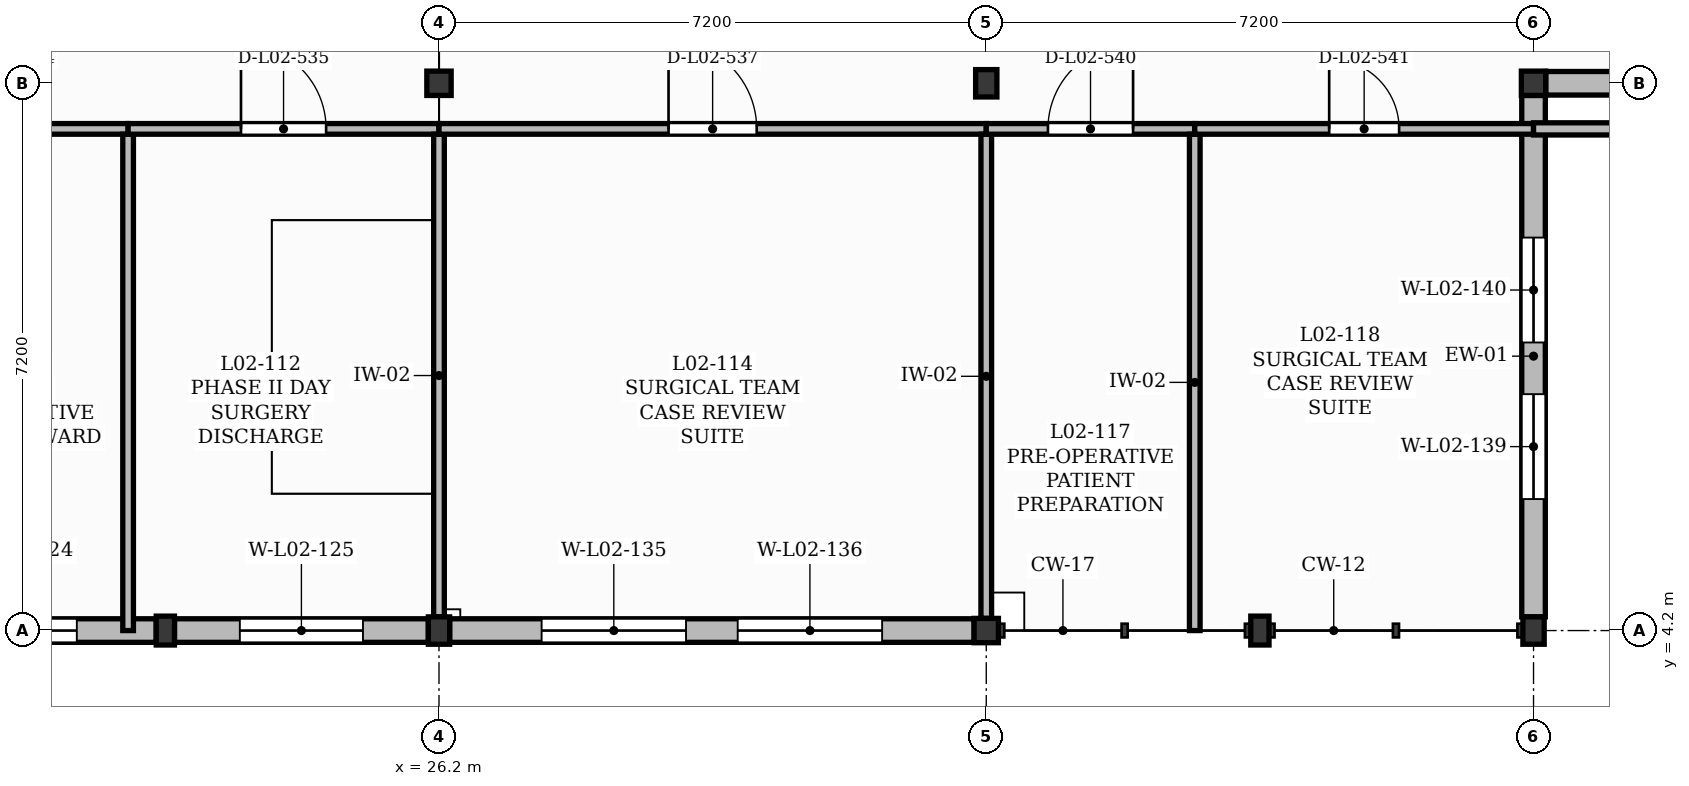
"""IFC4 building model, lengths in metres.
Left out: names, types, materials, properties, quantities, classifications, styles, units other than length and angle.
Written with IfcOpenShell. Run it as: python <this file> out.ifc"""

import sys

from ifc_helpers import new_model, si_unit, direction, frame, frame_2d, origin, origin_2d, place, context, subcontext, project, spatial, rectangle, extrude, element, fill, save


model = new_model("IFC4")
c1 = context("Model", 3, precision=1e-05, world=origin(), true_north=direction((0.0, 1.0)))
c2 = subcontext(c1, "Body", "Model", "MODEL_VIEW")
j1 = project(units=[si_unit("LENGTHUNIT", "METRE"), si_unit("PLANEANGLEUNIT", "RADIAN")], contexts=[c1])
p1 = place(None, origin())
s1 = spatial("IfcSite", under=j1, at=p1, CompositionType="ELEMENT")
p2 = place(p1, origin())
s2 = spatial("IfcBuilding", under=s1, at=p2, CompositionType="ELEMENT")
p3 = place(p2, frame((0.0, 0.0, 9.0)))
s3 = spatial("IfcBuildingStorey", under=s2, at=p3, CompositionType="ELEMENT", Elevation=9.0)
p4 = place(p3, frame((26.2, 4.2, 0.0), z_axis=(0.0, 0.0, 1.0), x_axis=(1.0, 0.0, 0.0)))
e1 = element("IfcColumn", 1, at=p4, inside=s3, PredefinedType="COLUMN", context=c2, shape_type="SweptSolid", body=[
    extrude(rectangle(XDim=0.28, YDim=0.36, at=origin_2d()), origin(), (0.0, 0.0, 1.0), 3.95),
])
for number, where, z_axis, x_axis in (
    (2, (26.2, 11.4, 0.0), (0.0, 0.0, 1.0), (1.0, 0.0, 0.0)),
    (3, (33.4, 4.2, 0.0), (0.0, 0.0, 1.0), (1.0, 0.0, 0.0)),
):
    element("IfcColumn", number, at=place(p3, frame(where, z_axis=z_axis, x_axis=x_axis)), inside=s3, PredefinedType="COLUMN", context=c2, shape_type="SweptSolid", body=[
        extrude(rectangle(XDim=0.32, YDim=0.32, at=origin_2d()), origin(), (0.0, 0.0, 1.0), 3.95),
    ])
for number, where, z_axis, x_axis in (
    (4, (33.4, 11.4, 0.0), (0.0, 0.0, 1.0), (1.0, 0.0, 0.0)),
    (5, (40.6, 4.2, 0.0), (0.0, 0.0, 1.0), (1.0, 0.0, 0.0)),
):
    element("IfcColumn", number, at=place(p3, frame(where, z_axis=z_axis, x_axis=x_axis)), inside=s3, PredefinedType="COLUMN", context=c2, shape_type="SweptSolid", body=[
        extrude(rectangle(XDim=0.28, YDim=0.36, at=origin_2d()), origin(), (0.0, 0.0, 1.0), 3.95),
    ])
p5 = place(p3, frame((40.6, 11.4, 0.0), z_axis=(0.0, 0.0, 1.0), x_axis=(1.0, 0.0, 0.0)))
e6 = element("IfcColumn", 6, at=p5, inside=s3, PredefinedType="COLUMN", context=c2, shape_type="SweptSolid", body=[
    extrude(rectangle(XDim=0.32, YDim=0.32, at=origin_2d()), origin(), (0.0, 0.0, 1.0), 3.95),
])
for number, where, z_axis, x_axis in (
    (7, (22.6, 4.2, 0.0), (0.0, 0.0, 1.0), (1.0, 0.0, 0.0)),
    (8, (37.0, 4.2, 0.0), (0.0, 0.0, 1.0), (1.0, 0.0, 0.0)),
):
    element("IfcColumn", number, at=place(p3, frame(where, z_axis=z_axis, x_axis=x_axis)), inside=s3, PredefinedType="PILASTER", context=c2, shape_type="SweptSolid", body=[
        extrude(rectangle(XDim=0.24, YDim=0.38, at=origin_2d()), origin(), (0.0, 0.0, 1.0), 3.95),
    ])
p6 = place(p3, frame((19.16, 4.2, 0.0), z_axis=(0.0, 0.0, 1.0), x_axis=(1.0, 0.0, 0.0)))
e9 = element("IfcWall", 9, at=p6, inside=s3, PredefinedType="SOLIDWALL", context=c2, shape_type="SweptSolid", body=[
    extrude(rectangle(XDim=3.32, YDim=0.31, at=frame_2d((1.66, 0.0))), origin(), (0.0, 0.0, 1.0), 3.49),
])
p7 = place(p6, frame((0.795, 0.0, 1.0)))
e10 = element("IfcOpeningElement", 10, at=p7, cuts=e9, PredefinedType="OPENING", context=c2, shape_type="SweptSolid", body=[
    extrude(rectangle(XDim=1.48, YDim=1.95, at=frame_2d((0.74, 0.975))), frame((0.0, 0.165, 0.0), z_axis=(0.0, -1.0, 0.0), x_axis=(1.0, 0.0, 0.0)), (0.0, 0.0, 1.0), 0.33),
])
p8 = place(p3, frame((22.72, 4.2, 0.0), z_axis=(0.0, 0.0, 1.0), x_axis=(1.0, 0.0, 0.0)))
e11 = element("IfcWall", 11, at=p8, inside=s3, PredefinedType="SOLIDWALL", context=c2, shape_type="SweptSolid", body=[
    extrude(rectangle(XDim=3.34, YDim=0.31, at=frame_2d((1.67, 0.0))), origin(), (0.0, 0.0, 1.0), 3.49),
])
p9 = place(p8, frame((0.86, 0.0, 1.0)))
e12 = element("IfcOpeningElement", 12, at=p9, cuts=e11, PredefinedType="OPENING", context=c2, shape_type="SweptSolid", body=[
    extrude(rectangle(XDim=1.62, YDim=1.95, at=frame_2d((0.81, 0.975))), frame((0.0, 0.165, 0.0), z_axis=(0.0, -1.0, 0.0), x_axis=(1.0, 0.0, 0.0)), (0.0, 0.0, 1.0), 0.33),
])
p10 = place(p3, frame((26.34, 4.2, 0.0), z_axis=(0.0, 0.0, 1.0), x_axis=(1.0, 0.0, 0.0)))
e13 = element("IfcWall", 13, at=p10, inside=s3, PredefinedType="SOLIDWALL", context=c2, shape_type="SweptSolid", body=[
    extrude(rectangle(XDim=6.9, YDim=0.31, at=frame_2d((3.45, 0.0))), origin(), (0.0, 0.0, 1.0), 3.49),
])
p11 = place(p10, frame((1.21, 0.0, 1.0)))
e14 = element("IfcOpeningElement", 14, at=p11, cuts=e13, PredefinedType="OPENING", context=c2, shape_type="SweptSolid", body=[
    extrude(rectangle(XDim=1.9, YDim=1.95, at=frame_2d((0.95, 0.975))), frame((0.0, 0.165, 0.0), z_axis=(0.0, -1.0, 0.0), x_axis=(1.0, 0.0, 0.0)), (0.0, 0.0, 1.0), 0.33),
])
p12 = place(p10, frame((3.79, 0.0, 1.0)))
e15 = element("IfcOpeningElement", 15, at=p12, cuts=e13, PredefinedType="OPENING", context=c2, shape_type="SweptSolid", body=[
    extrude(rectangle(XDim=1.9, YDim=1.95, at=frame_2d((0.95, 0.975))), frame((0.0, 0.165, 0.0), z_axis=(0.0, -1.0, 0.0), x_axis=(1.0, 0.0, 0.0)), (0.0, 0.0, 1.0), 0.33),
])
p13 = place(p3, frame((40.6, 4.38, 0.0), z_axis=(0.0, 0.0, 1.0), x_axis=(0.0, 1.0, 0.0)))
e16 = element("IfcWall", 16, at=p13, inside=s3, PredefinedType="SOLIDWALL", context=c2, shape_type="SweptSolid", body=[
    extrude(rectangle(XDim=6.86, YDim=0.31, at=frame_2d((3.43, 0.0))), origin(), (0.0, 0.0, 1.0), 3.49),
])
p14 = place(p13, frame((1.55, 0.0, 1.0)))
e17 = element("IfcOpeningElement", 17, at=p14, cuts=e16, PredefinedType="OPENING", context=c2, shape_type="SweptSolid", body=[
    extrude(rectangle(XDim=1.38, YDim=1.8, at=frame_2d((0.69, 0.9))), frame((0.0, 0.165, 0.0), z_axis=(0.0, -1.0, 0.0), x_axis=(1.0, 0.0, 0.0)), (0.0, 0.0, 1.0), 0.33),
])
p15 = place(p13, frame((3.61, 0.0, 1.0)))
e18 = element("IfcOpeningElement", 18, at=p15, cuts=e16, PredefinedType="OPENING", context=c2, shape_type="SweptSolid", body=[
    extrude(rectangle(XDim=1.38, YDim=1.8, at=frame_2d((0.69, 0.9))), frame((0.0, 0.165, 0.0), z_axis=(0.0, -1.0, 0.0), x_axis=(1.0, 0.0, 0.0)), (0.0, 0.0, 1.0), 0.33),
])
p16 = place(p3, frame((40.76, 11.4, 0.0), z_axis=(0.0, 0.0, 1.0), x_axis=(1.0, 0.0, 0.0)))
e19 = element("IfcWall", 19, at=p16, inside=s3, PredefinedType="SOLIDWALL", context=c2, shape_type="SweptSolid", body=[
    extrude(rectangle(XDim=6.9, YDim=0.31, at=frame_2d((3.45, 0.0))), origin(), (0.0, 0.0, 1.0), 3.49),
])
p17 = place(p16, frame((1.45, 0.0, 1.0)))
e20 = element("IfcOpeningElement", 20, at=p17, cuts=e19, PredefinedType="OPENING", context=c2, shape_type="SweptSolid", body=[
    extrude(rectangle(XDim=1.66, YDim=1.8, at=frame_2d((0.83, 0.9))), frame((0.0, 0.165, 0.0), z_axis=(0.0, -1.0, 0.0), x_axis=(1.0, 0.0, 0.0)), (0.0, 0.0, 1.0), 0.33),
])
p18 = place(p16, frame((3.79, 0.0, 1.0)))
e21 = element("IfcOpeningElement", 21, at=p18, cuts=e19, PredefinedType="OPENING", context=c2, shape_type="SweptSolid", body=[
    extrude(rectangle(XDim=1.66, YDim=1.8, at=frame_2d((0.83, 0.9))), frame((0.0, 0.165, 0.0), z_axis=(0.0, -1.0, 0.0), x_axis=(1.0, 0.0, 0.0)), (0.0, 0.0, 1.0), 0.33),
])
p19 = place(p3, frame((19.0, 10.8, 0.0), z_axis=(0.0, 0.0, 1.0), x_axis=(1.0, 0.0, 0.0)))
e22 = element("IfcWall", 22, at=p19, inside=s3, PredefinedType="PARTITIONING", context=c2, shape_type="SweptSolid", body=[
    extrude(rectangle(XDim=3.11, YDim=0.14, at=frame_2d((1.555, 0.0))), origin(), (0.0, 0.0, 1.0), 3.91),
])
p20 = place(p19, frame((1.035, 0.0, 0.0)))
e23 = element("IfcOpeningElement", 23, at=p20, cuts=e22, PredefinedType="OPENING", context=c2, shape_type="SweptSolid", body=[
    extrude(rectangle(XDim=1.04, YDim=2.1, at=frame_2d((0.52, 1.05))), frame((0.0, 0.08, 0.0), z_axis=(0.0, -1.0, 0.0), x_axis=(1.0, 0.0, 0.0)), (0.0, 0.0, 1.0), 0.16),
])
p21 = place(p3, frame((22.11, 4.2, 0.0), z_axis=(0.0, 0.0, 1.0), x_axis=(0.0, 1.0, 0.0)))
e24 = element("IfcWall", 24, at=p21, inside=s3, PredefinedType="PARTITIONING", context=c2, shape_type="SweptSolid", body=[
    extrude(rectangle(XDim=6.53, YDim=0.14, at=frame_2d((3.265, 0.0))), origin(), (0.0, 0.0, 1.0), 3.91),
])
p22 = place(p3, frame((22.11, 10.8, 0.0), z_axis=(0.0, 0.0, 1.0), x_axis=(1.0, 0.0, 0.0)))
e25 = element("IfcWall", 25, at=p22, inside=s3, PredefinedType="PARTITIONING", context=c2, shape_type="SweptSolid", body=[
    extrude(rectangle(XDim=4.09, YDim=0.14, at=frame_2d((2.045, 0.0))), origin(), (0.0, 0.0, 1.0), 3.91),
])
p23 = place(p22, frame((1.485, 0.0, 0.0)))
e26 = element("IfcOpeningElement", 26, at=p23, cuts=e25, PredefinedType="OPENING", context=c2, shape_type="SweptSolid", body=[
    extrude(rectangle(XDim=1.12, YDim=2.15, at=frame_2d((0.56, 1.075))), frame((0.0, 0.08, 0.0), z_axis=(0.0, -1.0, 0.0), x_axis=(1.0, 0.0, 0.0)), (0.0, 0.0, 1.0), 0.16),
])
p24 = place(p3, frame((26.2, 4.38, 0.0), z_axis=(0.0, 0.0, 1.0), x_axis=(0.0, 1.0, 0.0)))
e27 = element("IfcWall", 27, at=p24, inside=s3, PredefinedType="PARTITIONING", context=c2, shape_type="SweptSolid", body=[
    extrude(rectangle(XDim=6.35, YDim=0.14, at=frame_2d((3.175, 0.0))), origin(), (0.0, 0.0, 1.0), 3.49),
])
p25 = place(p3, frame((26.2, 10.8, 0.0), z_axis=(0.0, 0.0, 1.0), x_axis=(1.0, 0.0, 0.0)))
e28 = element("IfcWall", 28, at=p25, inside=s3, PredefinedType="PARTITIONING", context=c2, shape_type="SweptSolid", body=[
    extrude(rectangle(XDim=7.2, YDim=0.14, at=frame_2d((3.6, 0.0))), origin(), (0.0, 0.0, 1.0), 3.91),
])
p26 = place(p25, frame((3.02, 0.0, 0.0)))
e29 = element("IfcOpeningElement", 29, at=p26, cuts=e28, PredefinedType="OPENING", context=c2, shape_type="SweptSolid", body=[
    extrude(rectangle(XDim=1.16, YDim=2.1, at=frame_2d((0.58, 1.05))), frame((0.0, 0.08, 0.0), z_axis=(0.0, -1.0, 0.0), x_axis=(1.0, 0.0, 0.0)), (0.0, 0.0, 1.0), 0.16),
])
p27 = place(p3, frame((33.4, 4.36, 0.0), z_axis=(0.0, 0.0, 1.0), x_axis=(0.0, 1.0, 0.0)))
e30 = element("IfcWall", 30, at=p27, inside=s3, PredefinedType="PARTITIONING", context=c2, shape_type="SweptSolid", body=[
    extrude(rectangle(XDim=6.37, YDim=0.14, at=frame_2d((3.185, 0.0))), origin(), (0.0, 0.0, 1.0), 3.49),
])
p28 = place(p3, frame((33.4, 10.8, 0.0), z_axis=(0.0, 0.0, 1.0), x_axis=(1.0, 0.0, 0.0)))
e31 = element("IfcWall", 31, at=p28, inside=s3, PredefinedType="PARTITIONING", context=c2, shape_type="SweptSolid", body=[
    extrude(rectangle(XDim=2.743, YDim=0.14, at=frame_2d((1.372, 0.0))), origin(), (0.0, 0.0, 1.0), 3.91),
])
p29 = place(p28, frame((0.812, 0.0, 0.0)))
e32 = element("IfcOpeningElement", 32, at=p29, cuts=e31, PredefinedType="OPENING", context=c2, shape_type="SweptSolid", body=[
    extrude(rectangle(XDim=1.12, YDim=2.15, at=frame_2d((0.56, 1.075))), frame((0.0, 0.08, 0.0), z_axis=(0.0, -1.0, 0.0), x_axis=(1.0, 0.0, 0.0)), (0.0, 0.0, 1.0), 0.16),
])
p30 = place(p3, frame((36.143, 4.2, 0.0), z_axis=(0.0, 0.0, 1.0), x_axis=(0.0, 1.0, 0.0)))
e33 = element("IfcWall", 33, at=p30, inside=s3, PredefinedType="PARTITIONING", context=c2, shape_type="SweptSolid", body=[
    extrude(rectangle(XDim=6.53, YDim=0.14, at=frame_2d((3.265, 0.0))), origin(), (0.0, 0.0, 1.0), 3.91),
])
p31 = place(p3, frame((36.143, 10.8, 0.0), z_axis=(0.0, 0.0, 1.0), x_axis=(1.0, 0.0, 0.0)))
e34 = element("IfcWall", 34, at=p31, inside=s3, PredefinedType="PARTITIONING", context=c2, shape_type="SweptSolid", body=[
    extrude(rectangle(XDim=4.457, YDim=0.14, at=frame_2d((2.229, 0.0))), origin(), (0.0, 0.0, 1.0), 3.91),
])
p32 = place(p31, frame((1.769, 0.0, 0.0)))
e35 = element("IfcOpeningElement", 35, at=p32, cuts=e34, PredefinedType="OPENING", context=c2, shape_type="SweptSolid", body=[
    extrude(rectangle(XDim=0.92, YDim=2.1, at=frame_2d((0.46, 1.05))), frame((0.0, 0.08, 0.0), z_axis=(0.0, -1.0, 0.0), x_axis=(1.0, 0.0, 0.0)), (0.0, 0.0, 1.0), 0.16),
])
p33 = place(p3, frame((40.6, 10.8, 0.0), z_axis=(0.0, 0.0, 1.0), x_axis=(1.0, 0.0, 0.0)))
e36 = element("IfcWall", 36, at=p33, inside=s3, PredefinedType="PARTITIONING", context=c2, shape_type="SweptSolid", body=[
    extrude(rectangle(XDim=7.2, YDim=0.16, at=frame_2d((3.6, 0.0))), origin(), (0.0, 0.0, 1.0), 3.96),
])
p34 = place(p7, origin())
e37 = element("IfcWindow", 37, at=p34, inside=s3, PartitioningType="SINGLE_PANEL", PredefinedType="WINDOW", context=c2, shape_type="SweptSolid", body=[
    extrude(rectangle(XDim=1.48, YDim=1.95, at=frame_2d((0.74, 0.975))), frame((0.0, 0.03, 0.0), z_axis=(0.0, -1.0, 0.0), x_axis=(1.0, 0.0, 0.0)), (0.0, 0.0, 1.0), 0.06),
])
fill(e10, e37)
p35 = place(p9, origin())
e38 = element("IfcWindow", 38, at=p35, inside=s3, PartitioningType="DOUBLE_PANEL_VERTICAL", PredefinedType="WINDOW", context=c2, shape_type="SweptSolid", body=[
    extrude(rectangle(XDim=1.62, YDim=1.95, at=frame_2d((0.81, 0.975))), frame((0.0, 0.03, 0.0), z_axis=(0.0, -1.0, 0.0), x_axis=(1.0, 0.0, 0.0)), (0.0, 0.0, 1.0), 0.06),
])
fill(e12, e38)
p36 = place(p11, origin())
e39 = element("IfcWindow", 39, at=p36, inside=s3, PartitioningType="DOUBLE_PANEL_VERTICAL", PredefinedType="WINDOW", context=c2, shape_type="SweptSolid", body=[
    extrude(rectangle(XDim=1.9, YDim=1.95, at=frame_2d((0.95, 0.975))), frame((0.0, 0.03, 0.0), z_axis=(0.0, -1.0, 0.0), x_axis=(1.0, 0.0, 0.0)), (0.0, 0.0, 1.0), 0.06),
])
fill(e14, e39)
p37 = place(p12, origin())
e40 = element("IfcWindow", 40, at=p37, inside=s3, PartitioningType="DOUBLE_PANEL_VERTICAL", PredefinedType="WINDOW", context=c2, shape_type="SweptSolid", body=[
    extrude(rectangle(XDim=1.9, YDim=1.95, at=frame_2d((0.95, 0.975))), frame((0.0, 0.03, 0.0), z_axis=(0.0, -1.0, 0.0), x_axis=(1.0, 0.0, 0.0)), (0.0, 0.0, 1.0), 0.06),
])
fill(e15, e40)
p38 = place(p14, origin())
e41 = element("IfcWindow", 41, at=p38, inside=s3, PartitioningType="SINGLE_PANEL", PredefinedType="WINDOW", context=c2, shape_type="SweptSolid", body=[
    extrude(rectangle(XDim=1.38, YDim=1.8, at=frame_2d((0.69, 0.9))), frame((0.0, 0.03, 0.0), z_axis=(0.0, -1.0, 0.0), x_axis=(1.0, 0.0, 0.0)), (0.0, 0.0, 1.0), 0.06),
])
fill(e17, e41)
p39 = place(p15, origin())
e42 = element("IfcWindow", 42, at=p39, inside=s3, PartitioningType="SINGLE_PANEL", PredefinedType="WINDOW", context=c2, shape_type="SweptSolid", body=[
    extrude(rectangle(XDim=1.38, YDim=1.8, at=frame_2d((0.69, 0.9))), frame((0.0, 0.03, 0.0), z_axis=(0.0, -1.0, 0.0), x_axis=(1.0, 0.0, 0.0)), (0.0, 0.0, 1.0), 0.06),
])
fill(e18, e42)
p40 = place(p23, origin())
e43 = element("IfcDoor", 43, at=p40, inside=s3, OperationType="SINGLE_SWING_LEFT", PredefinedType="DOOR", context=c2, shape_type="SweptSolid", body=[
    extrude(rectangle(XDim=1.12, YDim=2.15, at=frame_2d((0.56, 1.075))), frame((0.0, 0.025, 0.0), z_axis=(0.0, -1.0, 0.0), x_axis=(1.0, 0.0, 0.0)), (0.0, 0.0, 1.0), 0.05),
])
fill(e26, e43)
p41 = place(p26, origin())
e44 = element("IfcDoor", 44, at=p41, inside=s3, OperationType="SINGLE_SWING_LEFT", PredefinedType="DOOR", context=c2, shape_type="SweptSolid", body=[
    extrude(rectangle(XDim=1.16, YDim=2.1, at=frame_2d((0.58, 1.05))), frame((0.0, 0.025, 0.0), z_axis=(0.0, -1.0, 0.0), x_axis=(1.0, 0.0, 0.0)), (0.0, 0.0, 1.0), 0.05),
])
fill(e29, e44)
p42 = place(p29, origin())
e45 = element("IfcDoor", 45, at=p42, inside=s3, OperationType="SINGLE_SWING_RIGHT", PredefinedType="DOOR", context=c2, shape_type="SweptSolid", body=[
    extrude(rectangle(XDim=1.12, YDim=2.15, at=frame_2d((0.56, 1.075))), frame((0.0, 0.025, 0.0), z_axis=(0.0, -1.0, 0.0), x_axis=(1.0, 0.0, 0.0)), (0.0, 0.0, 1.0), 0.05),
])
fill(e32, e45)
p43 = place(p32, origin())
e46 = element("IfcDoor", 46, at=p43, inside=s3, OperationType="SINGLE_SWING_LEFT", PredefinedType="DOOR", context=c2, shape_type="SweptSolid", body=[
    extrude(rectangle(XDim=0.92, YDim=2.1, at=frame_2d((0.46, 1.05))), frame((0.0, 0.025, 0.0), z_axis=(0.0, -1.0, 0.0), x_axis=(1.0, 0.0, 0.0)), (0.0, 0.0, 1.0), 0.05),
])
fill(e35, e46)
save(model, sys.argv[1])
